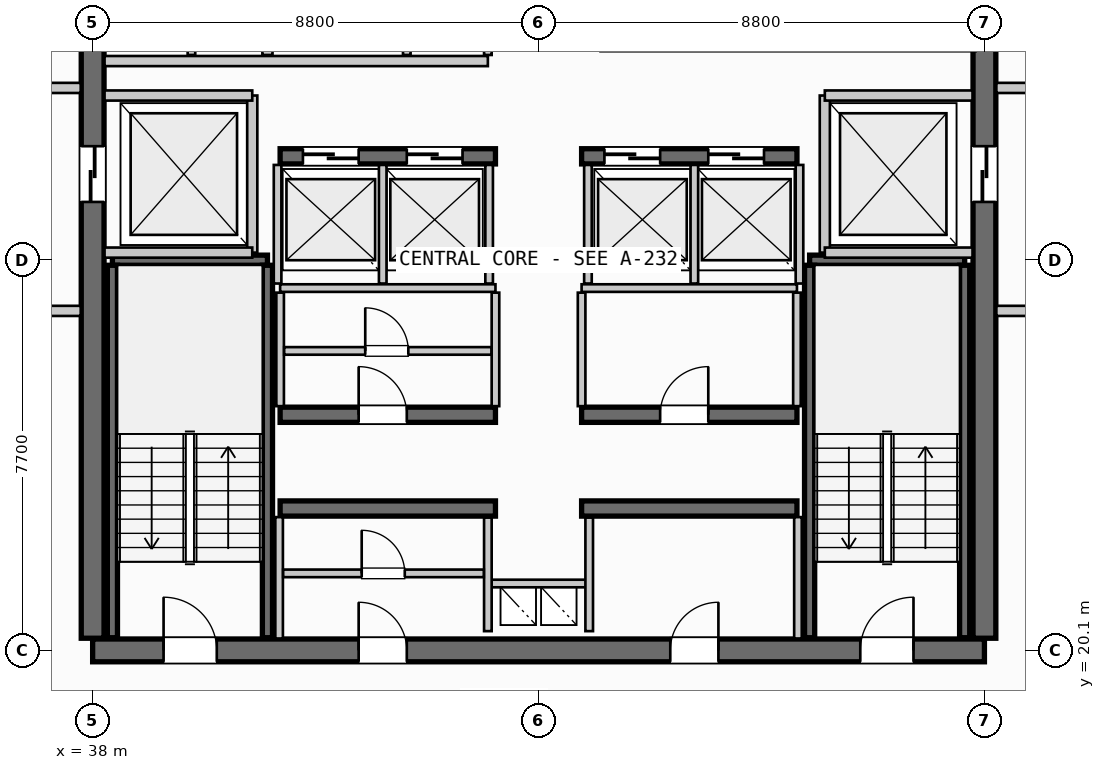
"""IFC4 building model, lengths in metres.
Left out: names, types, materials, properties, quantities, classifications, styles, units other than length and angle.
Written with IfcOpenShell. Run it as: python <this file> out.ifc"""

import sys

from ifc_helpers import new_model, si_unit, direction, frame, frame_2d, origin, place, context, subcontext, project, spatial, rectangle, extrude, source, transform, mapped, element, fill, save


model = new_model("IFC4")
c1 = context("Model", 3, precision=1e-05, world=origin(), true_north=direction((0.0, 1.0)))
c2 = subcontext(c1, "Body", "Model", "MODEL_VIEW")
j1 = project(units=[si_unit("LENGTHUNIT", "METRE"), si_unit("PLANEANGLEUNIT", "RADIAN")], contexts=[c1])
p1 = place(None, origin())
s1 = spatial("IfcSite", under=j1, at=p1, CompositionType="ELEMENT")
p2 = place(p1, origin())
s2 = spatial("IfcBuilding", under=s1, at=p2, CompositionType="ELEMENT")
p3 = place(p2, frame((0.0, 0.0, 235.3)))
s3 = spatial("IfcBuildingStorey", under=s2, at=p3, CompositionType="ELEMENT", Elevation=235.3)
p4 = place(p3, frame((38.0, 20.1, 0.0), z_axis=(0.0, 0.0, 1.0), x_axis=(1.0, 0.0, 0.0)))
e1 = element("IfcWall", 1, at=p4, inside=s3, PredefinedType="SHEAR", context=c2, shape_type="SweptSolid", body=[
    extrude(rectangle(XDim=17.6, YDim=0.45, at=frame_2d((8.8, 0.0))), origin(), (0.0, 0.0, 1.0), 3.21),
])
p5 = place(p4, frame((1.4, 0.0, 0.0)))
e2 = element("IfcOpeningElement", 2, at=p5, cuts=e1, PredefinedType="OPENING", context=c2, shape_type="SweptSolid", body=[
    extrude(rectangle(XDim=1.05, YDim=2.15, at=frame_2d((0.525, 1.075))), frame((0.0, 0.235, 0.0), z_axis=(0.0, -1.0, 0.0), x_axis=(1.0, 0.0, 0.0)), (0.0, 0.0, 1.0), 0.47),
])
p6 = place(p4, frame((15.15, 0.0, 0.0)))
e3 = element("IfcOpeningElement", 3, at=p6, cuts=e1, PredefinedType="OPENING", context=c2, shape_type="SweptSolid", body=[
    extrude(rectangle(XDim=1.05, YDim=2.15, at=frame_2d((0.525, 1.075))), frame((0.0, 0.235, 0.0), z_axis=(0.0, -1.0, 0.0), x_axis=(1.0, 0.0, 0.0)), (0.0, 0.0, 1.0), 0.47),
])
p7 = place(p4, frame((5.25, 0.0, 0.0)))
e4 = element("IfcOpeningElement", 4, at=p7, cuts=e1, PredefinedType="OPENING", context=c2, shape_type="SweptSolid", body=[
    extrude(rectangle(XDim=0.95, YDim=2.15, at=frame_2d((0.475, 1.075))), frame((0.0, 0.235, 0.0), z_axis=(0.0, -1.0, 0.0), x_axis=(1.0, 0.0, 0.0)), (0.0, 0.0, 1.0), 0.47),
])
p8 = place(p4, frame((11.4, 0.0, 0.0)))
e5 = element("IfcOpeningElement", 5, at=p8, cuts=e1, PredefinedType="OPENING", context=c2, shape_type="SweptSolid", body=[
    extrude(rectangle(XDim=0.95, YDim=2.15, at=frame_2d((0.475, 1.075))), frame((0.0, 0.235, 0.0), z_axis=(0.0, -1.0, 0.0), x_axis=(1.0, 0.0, 0.0)), (0.0, 0.0, 1.0), 0.47),
])
p9 = place(p3, frame((38.0, 35.26, 0.0), z_axis=(0.0, 0.0, 1.0), x_axis=(0.0, -1.0, 0.0)))
e6 = element("IfcWall", 6, at=p9, inside=s3, PredefinedType="SHEAR", context=c2, shape_type="SweptSolid", body=[
    extrude(rectangle(XDim=14.92, YDim=0.45, at=frame_2d((7.46, 0.0))), origin(), (0.0, 0.0, 1.0), 3.21),
])
p10 = place(p9, frame((5.21, 0.0, 0.0)))
e7 = element("IfcOpeningElement", 7, at=p10, cuts=e6, PredefinedType="OPENING", context=c2, shape_type="SweptSolid", body=[
    extrude(rectangle(XDim=1.1, YDim=2.2, at=frame_2d((0.55, 1.1))), frame((0.0, 0.235, 0.0), z_axis=(0.0, -1.0, 0.0), x_axis=(1.0, 0.0, 0.0)), (0.0, 0.0, 1.0), 0.47),
])
p11 = place(p3, frame((55.6, 20.34, 0.0), z_axis=(0.0, 0.0, 1.0), x_axis=(0.0, 1.0, 0.0)))
e8 = element("IfcWall", 8, at=p11, inside=s3, PredefinedType="SHEAR", context=c2, shape_type="SweptSolid", body=[
    extrude(rectangle(XDim=14.92, YDim=0.45, at=frame_2d((7.46, 0.0))), origin(), (0.0, 0.0, 1.0), 3.21),
])
p12 = place(p11, frame((12.71, 0.0, 0.0)))
e9 = element("IfcOpeningElement", 9, at=p12, cuts=e8, PredefinedType="OPENING", context=c2, shape_type="SweptSolid", body=[
    extrude(rectangle(XDim=1.05, YDim=2.15, at=frame_2d((0.525, 1.075))), frame((0.0, 0.235, 0.0), z_axis=(0.0, -1.0, 0.0), x_axis=(1.0, 0.0, 0.0)), (0.0, 0.0, 1.0), 0.47),
])
p13 = place(p11, frame((8.61, 0.0, 0.0)))
e10 = element("IfcOpeningElement", 10, at=p13, cuts=e8, PredefinedType="OPENING", context=c2, shape_type="SweptSolid", body=[
    extrude(rectangle(XDim=1.1, YDim=2.2, at=frame_2d((0.55, 1.1))), frame((0.0, 0.235, 0.0), z_axis=(0.0, -1.0, 0.0), x_axis=(1.0, 0.0, 0.0)), (0.0, 0.0, 1.0), 0.47),
])
for number, where, z_axis, x_axis in (
    (11, (41.7, 22.9, 0.0), (0.0, 0.0, 1.0), (1.0, 0.0, 0.0)),
    (12, (47.65, 22.9, 0.0), (0.0, 0.0, 1.0), (1.0, 0.0, 0.0)),
):
    element("IfcWall", number, at=place(p3, frame(where, z_axis=z_axis, x_axis=x_axis)), inside=s3, PredefinedType="SHEAR", context=c2, shape_type="SweptSolid", body=[
        extrude(rectangle(XDim=4.25, YDim=0.3, at=frame_2d((2.125, 0.0))), origin(), (0.0, 0.0, 1.0), 3.21),
    ])
p14 = place(p3, frame((41.7, 24.75, 0.0), z_axis=(0.0, 0.0, 1.0), x_axis=(1.0, 0.0, 0.0)))
e13 = element("IfcWall", 13, at=p14, inside=s3, PredefinedType="SHEAR", context=c2, shape_type="SweptSolid", body=[
    extrude(rectangle(XDim=4.25, YDim=0.3, at=frame_2d((2.125, 0.0))), origin(), (0.0, 0.0, 1.0), 3.21),
])
p15 = place(p14, frame((1.55, 0.0, 0.0)))
e14 = element("IfcOpeningElement", 14, at=p15, cuts=e13, PredefinedType="OPENING", context=c2, shape_type="SweptSolid", body=[
    extrude(rectangle(XDim=0.95, YDim=2.15, at=frame_2d((0.475, 1.075))), frame((0.0, 0.16, 0.0), z_axis=(0.0, -1.0, 0.0), x_axis=(1.0, 0.0, 0.0)), (0.0, 0.0, 1.0), 0.32),
])
p16 = place(p3, frame((47.65, 24.75, 0.0), z_axis=(0.0, 0.0, 1.0), x_axis=(1.0, 0.0, 0.0)))
e15 = element("IfcWall", 15, at=p16, inside=s3, PredefinedType="SHEAR", context=c2, shape_type="SweptSolid", body=[
    extrude(rectangle(XDim=4.25, YDim=0.3, at=frame_2d((2.125, 0.0))), origin(), (0.0, 0.0, 1.0), 3.21),
])
p17 = place(p16, frame((1.55, 0.0, 0.0)))
e16 = element("IfcOpeningElement", 16, at=p17, cuts=e15, PredefinedType="OPENING", context=c2, shape_type="SweptSolid", body=[
    extrude(rectangle(XDim=0.95, YDim=2.15, at=frame_2d((0.475, 1.075))), frame((0.0, 0.16, 0.0), z_axis=(0.0, -1.0, 0.0), x_axis=(1.0, 0.0, 0.0)), (0.0, 0.0, 1.0), 0.32),
])
p18 = place(p3, frame((41.7, 29.85, 0.0), z_axis=(0.0, 0.0, 1.0), x_axis=(1.0, 0.0, 0.0)))
e17 = element("IfcWall", 17, at=p18, inside=s3, PredefinedType="SHEAR", context=c2, shape_type="SweptSolid", body=[
    extrude(rectangle(XDim=4.25, YDim=0.3, at=frame_2d((2.125, 0.0))), origin(), (0.0, 0.0, 1.0), 3.21),
])
p19 = place(p18, frame((0.45, 0.0, 0.0)))
e18 = element("IfcOpeningElement", 18, at=p19, cuts=e17, PredefinedType="OPENING", context=c2, shape_type="SweptSolid", body=[
    extrude(rectangle(XDim=1.1, YDim=2.2, at=frame_2d((0.55, 1.1))), frame((0.0, 0.16, 0.0), z_axis=(0.0, -1.0, 0.0), x_axis=(1.0, 0.0, 0.0)), (0.0, 0.0, 1.0), 0.32),
])
p20 = place(p18, frame((2.5, 0.0, 0.0)))
e19 = element("IfcOpeningElement", 19, at=p20, cuts=e17, PredefinedType="OPENING", context=c2, shape_type="SweptSolid", body=[
    extrude(rectangle(XDim=1.1, YDim=2.2, at=frame_2d((0.55, 1.1))), frame((0.0, 0.16, 0.0), z_axis=(0.0, -1.0, 0.0), x_axis=(1.0, 0.0, 0.0)), (0.0, 0.0, 1.0), 0.32),
])
p21 = place(p3, frame((47.65, 29.85, 0.0), z_axis=(0.0, 0.0, 1.0), x_axis=(1.0, 0.0, 0.0)))
e20 = element("IfcWall", 20, at=p21, inside=s3, PredefinedType="SHEAR", context=c2, shape_type="SweptSolid", body=[
    extrude(rectangle(XDim=4.25, YDim=0.3, at=frame_2d((2.125, 0.0))), origin(), (0.0, 0.0, 1.0), 3.21),
])
p22 = place(p21, frame((0.45, 0.0, 0.0)))
e21 = element("IfcOpeningElement", 21, at=p22, cuts=e20, PredefinedType="OPENING", context=c2, shape_type="SweptSolid", body=[
    extrude(rectangle(XDim=1.1, YDim=2.2, at=frame_2d((0.55, 1.1))), frame((0.0, 0.16, 0.0), z_axis=(0.0, -1.0, 0.0), x_axis=(1.0, 0.0, 0.0)), (0.0, 0.0, 1.0), 0.32),
])
p23 = place(p21, frame((2.5, 0.0, 0.0)))
e22 = element("IfcOpeningElement", 22, at=p23, cuts=e20, PredefinedType="OPENING", context=c2, shape_type="SweptSolid", body=[
    extrude(rectangle(XDim=1.1, YDim=2.2, at=frame_2d((0.55, 1.1))), frame((0.0, 0.16, 0.0), z_axis=(0.0, -1.0, 0.0), x_axis=(1.0, 0.0, 0.0)), (0.0, 0.0, 1.0), 0.32),
])
p24 = place(p3, frame((38.39, 27.8, 0.0), z_axis=(0.0, 0.0, 1.0), x_axis=(1.0, 0.0, 0.0)))
e23 = element("IfcWall", 23, at=p24, inside=s3, PredefinedType="SHEAR", context=c2, shape_type="SweptSolid", body=[
    extrude(rectangle(XDim=3.06, YDim=0.2, at=frame_2d((1.53, 0.0))), origin(), (0.0, 0.0, 1.0), 3.21),
])
for number, where, z_axis, x_axis in (
    (24, (41.45, 27.7, 0.0), (0.0, 0.0, 1.0), (0.0, -1.0, 0.0)),
    (25, (38.39, 20.35, 0.0), (0.0, 0.0, 1.0), (0.0, 1.0, 0.0)),
):
    element("IfcWall", number, at=place(p3, frame(where, z_axis=z_axis, x_axis=x_axis)), inside=s3, PredefinedType="SHEAR", context=c2, shape_type="SweptSolid", body=[
        extrude(rectangle(XDim=7.35, YDim=0.2, at=frame_2d((3.675, 0.0))), origin(), (0.0, 0.0, 1.0), 3.21),
    ])
p25 = place(p3, frame((52.15, 27.8, 0.0), z_axis=(0.0, 0.0, 1.0), x_axis=(1.0, 0.0, 0.0)))
e26 = element("IfcWall", 26, at=p25, inside=s3, PredefinedType="SHEAR", context=c2, shape_type="SweptSolid", body=[
    extrude(rectangle(XDim=3.06, YDim=0.2, at=frame_2d((1.53, 0.0))), origin(), (0.0, 0.0, 1.0), 3.21),
])
for number, where, z_axis, x_axis in (
    (27, (55.21, 27.7, 0.0), (0.0, 0.0, 1.0), (0.0, -1.0, 0.0)),
    (28, (52.15, 20.35, 0.0), (0.0, 0.0, 1.0), (0.0, 1.0, 0.0)),
):
    element("IfcWall", number, at=place(p3, frame(where, z_axis=z_axis, x_axis=x_axis)), inside=s3, PredefinedType="SHEAR", context=c2, shape_type="SweptSolid", body=[
        extrude(rectangle(XDim=7.35, YDim=0.2, at=frame_2d((3.675, 0.0))), origin(), (0.0, 0.0, 1.0), 3.21),
    ])
p26 = place(p3, frame((45.8, 21.42, 0.0), z_axis=(0.0, 0.0, 1.0), x_axis=(1.0, 0.0, 0.0)))
e29 = element("IfcWall", 29, at=p26, inside=s3, PredefinedType="PARTITIONING", context=c2, shape_type="SweptSolid", body=[
    extrude(rectangle(XDim=2.0, YDim=0.15, at=frame_2d((1.0, 0.0))), origin(), (0.0, 0.0, 1.0), 2.28),
])
for number, where, z_axis, x_axis in (
    (30, (45.8, 20.48, 0.0), (0.0, 0.0, 1.0), (0.0, 1.0, 0.0)),
    (31, (47.8, 20.48, 0.0), (0.0, 0.0, 1.0), (0.0, 1.0, 0.0)),
):
    element("IfcWall", number, at=place(p3, frame(where, z_axis=z_axis, x_axis=x_axis)), inside=s3, PredefinedType="PARTITIONING", context=c2, shape_type="SweptSolid", body=[
        extrude(rectangle(XDim=2.24, YDim=0.15, at=frame_2d((1.12, 0.0))), origin(), (0.0, 0.0, 1.0), 2.28),
    ])
p27 = place(p3, frame((41.15, 27.95, 0.0), z_axis=(0.0, 0.0, 1.0), x_axis=(0.0, 1.0, 0.0)))
e32 = element("IfcWall", 32, at=p27, inside=s3, PredefinedType="PARTITIONING", context=c2, shape_type="SweptSolid", body=[
    extrude(rectangle(XDim=3.1, YDim=0.2, at=frame_2d((1.55, 0.0))), origin(), (0.0, 0.0, 1.0), 2.28),
])
for number, where, z_axis, x_axis in (
    (33, (38.235, 27.95, 0.0), (0.0, 0.0, 1.0), (1.0, 0.0, 0.0)),
    (34, (38.235, 31.05, 0.0), (0.0, 0.0, 1.0), (1.0, 0.0, 0.0)),
):
    element("IfcWall", number, at=place(p3, frame(where, z_axis=z_axis, x_axis=x_axis)), inside=s3, PredefinedType="PARTITIONING", context=c2, shape_type="SweptSolid", body=[
        extrude(rectangle(XDim=2.915, YDim=0.2, at=frame_2d((1.458, 0.0))), origin(), (0.0, 0.0, 1.0), 2.28),
    ])
for number, where, z_axis, x_axis in (
    (35, (34.5, 26.8, 0.0), (0.0, 0.0, 1.0), (1.0, 0.0, 0.0)),
    (36, (34.5, 31.2, 0.0), (0.0, 0.0, 1.0), (1.0, 0.0, 0.0)),
):
    element("IfcWall", number, at=place(p3, frame(where, z_axis=z_axis, x_axis=x_axis)), inside=s3, PredefinedType="PARTITIONING", context=c2, shape_type="SweptSolid", body=[
        extrude(rectangle(XDim=3.265, YDim=0.2, at=frame_2d((1.632, 0.0))), origin(), (0.0, 0.0, 1.0), 2.28),
    ])
p28 = place(p3, frame((52.45, 27.95, 0.0), z_axis=(0.0, 0.0, 1.0), x_axis=(0.0, 1.0, 0.0)))
e37 = element("IfcWall", 37, at=p28, inside=s3, PredefinedType="PARTITIONING", context=c2, shape_type="SweptSolid", body=[
    extrude(rectangle(XDim=3.1, YDim=0.2, at=frame_2d((1.55, 0.0))), origin(), (0.0, 0.0, 1.0), 2.28),
])
for number, where, z_axis, x_axis in (
    (38, (52.45, 27.95, 0.0), (0.0, 0.0, 1.0), (1.0, 0.0, 0.0)),
    (39, (52.45, 31.05, 0.0), (0.0, 0.0, 1.0), (1.0, 0.0, 0.0)),
):
    element("IfcWall", number, at=place(p3, frame(where, z_axis=z_axis, x_axis=x_axis)), inside=s3, PredefinedType="PARTITIONING", context=c2, shape_type="SweptSolid", body=[
        extrude(rectangle(XDim=2.915, YDim=0.2, at=frame_2d((1.458, 0.0))), origin(), (0.0, 0.0, 1.0), 2.28),
    ])
for number, where, z_axis, x_axis in (
    (40, (55.835, 26.8, 0.0), (0.0, 0.0, 1.0), (1.0, 0.0, 0.0)),
    (41, (55.835, 31.2, 0.0), (0.0, 0.0, 1.0), (1.0, 0.0, 0.0)),
):
    element("IfcWall", number, at=place(p3, frame(where, z_axis=z_axis, x_axis=x_axis)), inside=s3, PredefinedType="PARTITIONING", context=c2, shape_type="SweptSolid", body=[
        extrude(rectangle(XDim=3.265, YDim=0.2, at=frame_2d((1.633, 0.0))), origin(), (0.0, 0.0, 1.0), 2.28),
    ])
for number, where, z_axis, x_axis in (
    (42, (41.68, 20.335, 0.0), (0.0, 0.0, 1.0), (0.0, 1.0, 0.0)),
    (43, (51.92, 20.335, 0.0), (0.0, 0.0, 1.0), (0.0, 1.0, 0.0)),
):
    element("IfcWall", number, at=place(p3, frame(where, z_axis=z_axis, x_axis=x_axis)), inside=s3, PredefinedType="PARTITIONING", context=c2, shape_type="SweptSolid", body=[
        extrude(rectangle(XDim=2.395, YDim=0.15, at=frame_2d((1.198, 0.0))), origin(), (0.0, 0.0, 1.0), 2.28),
    ])
p29 = place(p3, frame((41.76, 21.62, 0.0), z_axis=(0.0, 0.0, 1.0), x_axis=(1.0, 0.0, 0.0)))
e44 = element("IfcWall", 44, at=p29, inside=s3, PredefinedType="PARTITIONING", context=c2, shape_type="SweptSolid", body=[
    extrude(rectangle(XDim=3.96, YDim=0.15, at=frame_2d((1.98, 0.0))), origin(), (0.0, 0.0, 1.0), 2.28),
])
p30 = place(p29, frame((1.55, 0.0, 0.0)))
e45 = element("IfcOpeningElement", 45, at=p30, cuts=e44, PredefinedType="OPENING", context=c2, shape_type="SweptSolid", body=[
    extrude(rectangle(XDim=0.85, YDim=2.15, at=frame_2d((0.425, 1.075))), frame((0.0, 0.085, 0.0), z_axis=(0.0, -1.0, 0.0), x_axis=(1.0, 0.0, 0.0)), (0.0, 0.0, 1.0), 0.17),
])
for number, where, z_axis, x_axis in (
    (46, (41.7, 27.25, 0.0), (0.0, 0.0, 1.0), (1.0, 0.0, 0.0)),
    (47, (47.65, 27.25, 0.0), (0.0, 0.0, 1.0), (1.0, 0.0, 0.0)),
):
    element("IfcWall", number, at=place(p3, frame(where, z_axis=z_axis, x_axis=x_axis)), inside=s3, PredefinedType="PARTITIONING", context=c2, shape_type="SweptSolid", body=[
        extrude(rectangle(XDim=4.25, YDim=0.15, at=frame_2d((2.125, 0.0))), origin(), (0.0, 0.0, 1.0), 2.28),
    ])
for number, where, z_axis, x_axis in (
    (48, (41.7, 24.92, 0.0), (0.0, 0.0, 1.0), (0.0, 1.0, 0.0)),
    (49, (45.95, 24.92, 0.0), (0.0, 0.0, 1.0), (0.0, 1.0, 0.0)),
    (50, (47.65, 24.92, 0.0), (0.0, 0.0, 1.0), (0.0, 1.0, 0.0)),
    (51, (51.9, 24.92, 0.0), (0.0, 0.0, 1.0), (0.0, 1.0, 0.0)),
):
    element("IfcWall", number, at=place(p3, frame(where, z_axis=z_axis, x_axis=x_axis)), inside=s3, PredefinedType="PARTITIONING", context=c2, shape_type="SweptSolid", body=[
        extrude(rectangle(XDim=2.24, YDim=0.15, at=frame_2d((1.12, 0.0))), origin(), (0.0, 0.0, 1.0), 2.28),
    ])
p31 = place(p3, frame((41.78, 26.01, 0.0), z_axis=(0.0, 0.0, 1.0), x_axis=(1.0, 0.0, 0.0)))
e52 = element("IfcWall", 52, at=p31, inside=s3, PredefinedType="PARTITIONING", context=c2, shape_type="SweptSolid", body=[
    extrude(rectangle(XDim=4.09, YDim=0.15, at=frame_2d((2.045, 0.0))), origin(), (0.0, 0.0, 1.0), 2.28),
])
p32 = place(p31, frame((1.6, 0.0, 0.0)))
e53 = element("IfcOpeningElement", 53, at=p32, cuts=e52, PredefinedType="OPENING", context=c2, shape_type="SweptSolid", body=[
    extrude(rectangle(XDim=0.85, YDim=2.15, at=frame_2d((0.425, 1.075))), frame((0.0, 0.085, 0.0), z_axis=(0.0, -1.0, 0.0), x_axis=(1.0, 0.0, 0.0)), (0.0, 0.0, 1.0), 0.17),
])
for number, where, z_axis, x_axis in (
    (54, (41.65, 27.34, 0.0), (0.0, 0.0, 1.0), (0.0, 1.0, 0.0)),
    (55, (43.725, 27.34, 0.0), (0.0, 0.0, 1.0), (0.0, 1.0, 0.0)),
    (56, (45.825, 27.34, 0.0), (0.0, 0.0, 1.0), (0.0, 1.0, 0.0)),
    (57, (47.775, 27.34, 0.0), (0.0, 0.0, 1.0), (0.0, 1.0, 0.0)),
    (58, (49.875, 27.34, 0.0), (0.0, 0.0, 1.0), (0.0, 1.0, 0.0)),
    (59, (51.95, 27.34, 0.0), (0.0, 0.0, 1.0), (0.0, 1.0, 0.0)),
):
    element("IfcWall", number, at=place(p3, frame(where, z_axis=z_axis, x_axis=x_axis)), inside=s3, PredefinedType="PARTITIONING", context=c2, shape_type="SweptSolid", body=[
        extrude(rectangle(XDim=2.34, YDim=0.15, at=frame_2d((1.17, 0.0))), origin(), (0.0, 0.0, 1.0), 2.28),
    ])
p33 = place(p3, frame((41.45, 31.85, 0.0), z_axis=(0.0, 0.0, 1.0), x_axis=(0.0, 1.0, 0.0)))
e60 = element("IfcWall", 60, at=p33, inside=s3, PredefinedType="PARTITIONING", context=c2, shape_type="SweptSolid", body=[
    extrude(rectangle(XDim=3.415, YDim=0.2, at=frame_2d((1.708, 0.0))), origin(), (0.0, 0.0, 1.0), 2.28),
])
p34 = place(p3, frame((38.235, 31.73, 0.0), z_axis=(0.0, 0.0, 1.0), x_axis=(1.0, 0.0, 0.0)))
e61 = element("IfcWall", 61, at=p34, inside=s3, PredefinedType="PARTITIONING", context=c2, shape_type="SweptSolid", body=[
    extrude(rectangle(XDim=7.565, YDim=0.2, at=frame_2d((3.782, 0.0))), origin(), (0.0, 0.0, 1.0), 2.28),
])
for number, where, z_axis, x_axis in (
    (62, (45.8, 31.85, 0.0), (0.0, 0.0, 1.0), (0.0, 1.0, 0.0)),
    (63, (39.95, 31.85, 0.0), (0.0, 0.0, 1.0), (0.0, 1.0, 0.0)),
):
    element("IfcWall", number, at=place(p3, frame(where, z_axis=z_axis, x_axis=x_axis)), inside=s3, PredefinedType="PARTITIONING", context=c2, shape_type="SweptSolid", body=[
        extrude(rectangle(XDim=3.415, YDim=0.15, at=frame_2d((1.708, 0.0))), origin(), (0.0, 0.0, 1.0), 2.28),
    ])
p35 = place(p3, frame((44.2, 31.85, 0.0), z_axis=(0.0, 0.0, 1.0), x_axis=(0.0, 1.0, 0.0)))
e64 = element("IfcWall", 64, at=p35, inside=s3, PredefinedType="PLUMBINGWALL", context=c2, shape_type="SweptSolid", body=[
    extrude(rectangle(XDim=3.415, YDim=0.15, at=frame_2d((1.708, 0.0))), origin(), (0.0, 0.0, 1.0), 2.28),
])
m1 = source(origin(), c2, "Body", "SweptSolid", [
    extrude(rectangle(XDim=1.05, YDim=2.15, at=frame_2d((0.525, 1.075))), frame((0.0, 0.025, 0.0), z_axis=(0.0, -1.0, 0.0), x_axis=(1.0, 0.0, 0.0)), (0.0, 0.0, 1.0), 0.05),
])
p36 = place(p5, origin())
e65 = element("IfcDoor", 65, at=p36, inside=s3, OperationType="SINGLE_SWING_LEFT", PredefinedType="DOOR", context=c2, shape_type="MappedRepresentation", body=[
    mapped(m1, transform((0.0, 0.0, 0.0), scale=1.0)),
])
fill(e2, e65)
p37 = place(p6, origin())
e66 = element("IfcDoor", 66, at=p37, inside=s3, OperationType="SINGLE_SWING_RIGHT", PredefinedType="DOOR", context=c2, shape_type="MappedRepresentation", body=[
    mapped(m1, transform((0.0, 0.0, 0.0), scale=1.0)),
])
fill(e3, e66)
m2 = source(origin(), c2, "Body", "SweptSolid", [
    extrude(rectangle(XDim=1.1, YDim=2.2, at=frame_2d((0.55, 1.1))), frame((0.0, 0.025, 0.0), z_axis=(0.0, -1.0, 0.0), x_axis=(1.0, 0.0, 0.0)), (0.0, 0.0, 1.0), 0.05),
])
p38 = place(p10, origin())
e67 = element("IfcDoor", 67, at=p38, inside=s3, OperationType="SLIDING_TO_LEFT", PredefinedType="DOOR", context=c2, shape_type="MappedRepresentation", body=[
    mapped(m2, transform((0.0, 0.0, 0.0), scale=1.0)),
])
fill(e7, e67)
p39 = place(p13, origin())
e68 = element("IfcDoor", 68, at=p39, inside=s3, OperationType="SLIDING_TO_RIGHT", PredefinedType="DOOR", context=c2, shape_type="MappedRepresentation", body=[
    mapped(m2, transform((0.0, 0.0, 0.0), scale=1.0)),
])
fill(e10, e68)
m3 = source(origin(), c2, "Body", "SweptSolid", [
    extrude(rectangle(XDim=0.95, YDim=2.15, at=frame_2d((0.475, 1.075))), frame((0.0, 0.025, 0.0), z_axis=(0.0, -1.0, 0.0), x_axis=(1.0, 0.0, 0.0)), (0.0, 0.0, 1.0), 0.05),
])
p40 = place(p7, origin())
e69 = element("IfcDoor", 69, at=p40, inside=s3, OperationType="SINGLE_SWING_LEFT", PredefinedType="DOOR", context=c2, shape_type="MappedRepresentation", body=[
    mapped(m3, transform((0.0, 0.0, 0.0), scale=1.0)),
])
fill(e4, e69)
p41 = place(p8, origin())
e70 = element("IfcDoor", 70, at=p41, inside=s3, OperationType="SINGLE_SWING_RIGHT", PredefinedType="DOOR", context=c2, shape_type="MappedRepresentation", body=[
    mapped(m3, transform((0.0, 0.0, 0.0), scale=1.0)),
])
fill(e5, e70)
p42 = place(p15, origin())
e71 = element("IfcDoor", 71, at=p42, inside=s3, OperationType="SINGLE_SWING_LEFT", PredefinedType="DOOR", context=c2, shape_type="MappedRepresentation", body=[
    mapped(m3, transform((0.0, 0.0, 0.0), scale=1.0)),
])
fill(e14, e71)
p43 = place(p17, origin())
e72 = element("IfcDoor", 72, at=p43, inside=s3, OperationType="SINGLE_SWING_RIGHT", PredefinedType="DOOR", context=c2, shape_type="MappedRepresentation", body=[
    mapped(m3, transform((0.0, 0.0, 0.0), scale=1.0)),
])
fill(e16, e72)
p44 = place(p19, origin())
e73 = element("IfcDoor", 73, at=p44, inside=s3, OperationType="SLIDING_TO_LEFT", PredefinedType="DOOR", context=c2, shape_type="MappedRepresentation", body=[
    mapped(m2, transform((0.0, 0.0, 0.0), scale=1.0)),
])
fill(e18, e73)
p45 = place(p20, origin())
e74 = element("IfcDoor", 74, at=p45, inside=s3, OperationType="SLIDING_TO_LEFT", PredefinedType="DOOR", context=c2, shape_type="MappedRepresentation", body=[
    mapped(m2, transform((0.0, 0.0, 0.0), scale=1.0)),
])
fill(e19, e74)
p46 = place(p22, origin())
e75 = element("IfcDoor", 75, at=p46, inside=s3, OperationType="SLIDING_TO_LEFT", PredefinedType="DOOR", context=c2, shape_type="MappedRepresentation", body=[
    mapped(m2, transform((0.0, 0.0, 0.0), scale=1.0)),
])
fill(e21, e75)
p47 = place(p23, origin())
e76 = element("IfcDoor", 76, at=p47, inside=s3, OperationType="SLIDING_TO_LEFT", PredefinedType="DOOR", context=c2, shape_type="MappedRepresentation", body=[
    mapped(m2, transform((0.0, 0.0, 0.0), scale=1.0)),
])
fill(e22, e76)
m4 = source(origin(), c2, "Body", "SweptSolid", [
    extrude(rectangle(XDim=0.85, YDim=2.15, at=frame_2d((0.425, 1.075))), frame((0.0, 0.025, 0.0), z_axis=(0.0, -1.0, 0.0), x_axis=(1.0, 0.0, 0.0)), (0.0, 0.0, 1.0), 0.05),
])
p48 = place(p30, origin())
e77 = element("IfcDoor", 77, at=p48, inside=s3, OperationType="SINGLE_SWING_LEFT", PredefinedType="DOOR", context=c2, shape_type="MappedRepresentation", body=[
    mapped(m4, transform((0.0, 0.0, 0.0), scale=1.0)),
])
fill(e45, e77)
p49 = place(p32, origin())
e78 = element("IfcDoor", 78, at=p49, inside=s3, OperationType="SINGLE_SWING_LEFT", PredefinedType="DOOR", context=c2, shape_type="MappedRepresentation", body=[
    mapped(m4, transform((0.0, 0.0, 0.0), scale=1.0)),
])
fill(e53, e78)
save(model, sys.argv[1])
